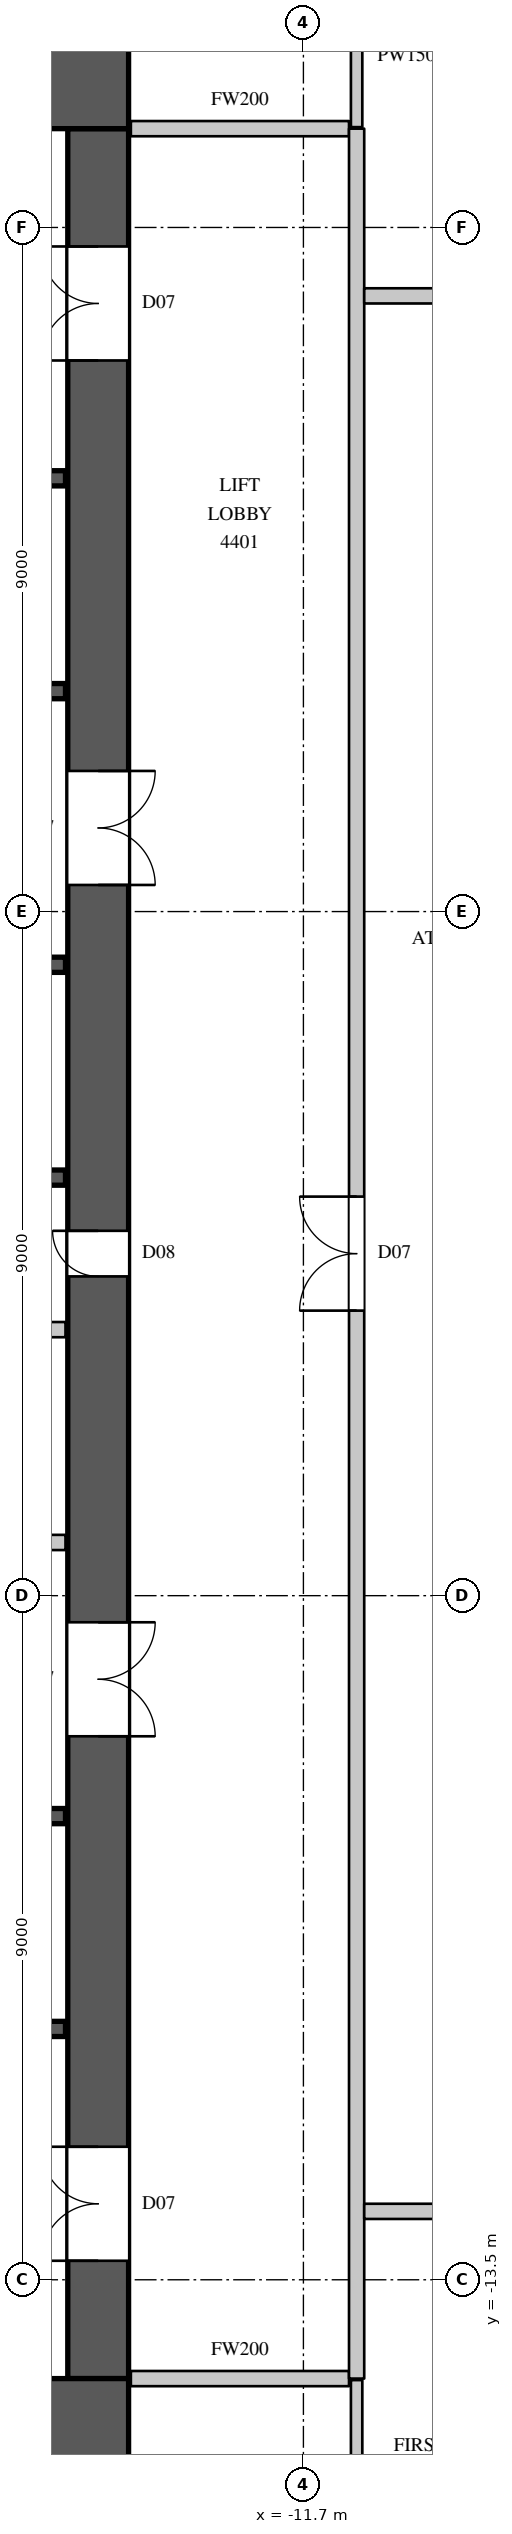
"""IFC4 building model, lengths in metres.
Left out: names, types, materials, properties, quantities, classifications, styles, units other than length and angle.
Written with IfcOpenShell. Run it as: python <this file> out.ifc"""

import sys

from ifc_helpers import new_model, si_unit, direction, frame, frame_2d, origin, place, context, subcontext, project, spatial, rectangle, extrude, element, fill, save


model = new_model("IFC4")
c1 = context("Model", 3, precision=1e-05, world=origin(), true_north=direction((0.0, 1.0)))
c2 = subcontext(c1, "Body", "Model", "MODEL_VIEW")
j1 = project(units=[si_unit("LENGTHUNIT", "METRE"), si_unit("PLANEANGLEUNIT", "RADIAN")], contexts=[c1])
p1 = place(None, origin())
s1 = spatial("IfcSite", under=j1, at=p1, CompositionType="ELEMENT")
p2 = place(p1, origin())
s2 = spatial("IfcBuilding", under=s1, at=p2, CompositionType="ELEMENT")
p3 = place(p2, frame((0.0, 0.0, 201.5)))
s3 = spatial("IfcBuildingStorey", under=s2, at=p3, CompositionType="ELEMENT", Elevation=201.5)
for number, where, z_axis, x_axis in (
    (1, (-30.0, 15.4, 0.0), (0.0, 0.0, 1.0), (1.0, 0.0, 0.0)),
    (2, (-30.0, -15.4, 0.0), (0.0, 0.0, 1.0), (1.0, 0.0, 0.0)),
):
    element("IfcWall", number, at=place(p3, frame(where, z_axis=z_axis, x_axis=x_axis)), inside=s3, PredefinedType="SHEAR", context=c2, shape_type="SweptSolid", body=[
        extrude(rectangle(XDim=16.0, YDim=1.2, at=frame_2d((8.0, 0.0))), origin(), (0.0, 0.0, 1.0), 4.1),
    ])
p4 = place(p3, frame((-14.4, -14.8, 0.0), z_axis=(0.0, 0.0, 1.0), x_axis=(0.0, 1.0, 0.0)))
e3 = element("IfcWall", 3, at=p4, inside=s3, PredefinedType="SHEAR", context=c2, shape_type="SweptSolid", body=[
    extrude(rectangle(XDim=29.6, YDim=0.8, at=frame_2d((14.8, 0.0))), origin(), (0.0, 0.0, 1.0), 4.1),
])
p5 = place(p4, frame((1.55, 0.0, 0.0)))
e4 = element("IfcOpeningElement", 4, at=p5, cuts=e3, PredefinedType="OPENING", context=c2, shape_type="SweptSolid", body=[
    extrude(rectangle(XDim=1.5, YDim=2.4, at=frame_2d((0.75, 1.2))), frame((0.0, 0.41, 0.0), z_axis=(0.0, -1.0, 0.0), x_axis=(1.0, 0.0, 0.0)), (0.0, 0.0, 1.0), 0.82),
])
p6 = place(p4, frame((26.55, 0.0, 0.0)))
e5 = element("IfcOpeningElement", 5, at=p6, cuts=e3, PredefinedType="OPENING", context=c2, shape_type="SweptSolid", body=[
    extrude(rectangle(XDim=1.5, YDim=2.4, at=frame_2d((0.75, 1.2))), frame((0.0, 0.41, 0.0), z_axis=(0.0, -1.0, 0.0), x_axis=(1.0, 0.0, 0.0)), (0.0, 0.0, 1.0), 0.82),
])
p7 = place(p4, frame((8.45, 0.0, 0.0)))
e6 = element("IfcOpeningElement", 6, at=p7, cuts=e3, PredefinedType="OPENING", context=c2, shape_type="SweptSolid", body=[
    extrude(rectangle(XDim=1.5, YDim=2.4, at=frame_2d((0.75, 1.2))), frame((0.0, 0.41, 0.0), z_axis=(0.0, -1.0, 0.0), x_axis=(1.0, 0.0, 0.0)), (0.0, 0.0, 1.0), 0.82),
])
p8 = place(p4, frame((19.65, 0.0, 0.0)))
e7 = element("IfcOpeningElement", 7, at=p8, cuts=e3, PredefinedType="OPENING", context=c2, shape_type="SweptSolid", body=[
    extrude(rectangle(XDim=1.5, YDim=2.4, at=frame_2d((0.75, 1.2))), frame((0.0, 0.41, 0.0), z_axis=(0.0, -1.0, 0.0), x_axis=(1.0, 0.0, 0.0)), (0.0, 0.0, 1.0), 0.82),
])
p9 = place(p4, frame((14.5, 0.0, 0.0)))
e8 = element("IfcOpeningElement", 8, at=p9, cuts=e3, PredefinedType="OPENING", context=c2, shape_type="SweptSolid", body=[
    extrude(rectangle(XDim=0.6, YDim=2.0, at=frame_2d((0.3, 1.0))), frame((0.0, 0.41, 0.0), z_axis=(0.0, -1.0, 0.0), x_axis=(1.0, 0.0, 0.0)), (0.0, 0.0, 1.0), 0.82),
])
p10 = place(p3, frame((-23.42, -3.8, 0.0), z_axis=(0.0, 0.0, 1.0), x_axis=(1.0, 0.0, 0.0)))
e9 = element("IfcWall", 9, at=p10, inside=s3, PredefinedType="PARTITIONING", context=c2, shape_type="SweptSolid", body=[
    extrude(rectangle(XDim=8.59, YDim=0.2, at=frame_2d((4.295, 0.0))), origin(), (0.0, 0.0, 1.0), 3.8),
])
p11 = place(p10, frame((2.0, 0.0, 0.0)))
e10 = element("IfcOpeningElement", 10, at=p11, cuts=e9, PredefinedType="OPENING", context=c2, shape_type="SweptSolid", body=[
    extrude(rectangle(XDim=0.9, YDim=2.2, at=frame_2d((0.45, 1.1))), frame((0.0, 0.11, 0.0), z_axis=(0.0, -1.0, 0.0), x_axis=(1.0, 0.0, 0.0)), (0.0, 0.0, 1.0), 0.22),
])
p12 = place(p10, frame((6.15, 0.0, 0.0)))
e11 = element("IfcOpeningElement", 11, at=p12, cuts=e9, PredefinedType="OPENING", context=c2, shape_type="SweptSolid", body=[
    extrude(rectangle(XDim=0.9, YDim=2.2, at=frame_2d((0.45, 1.1))), frame((0.0, 0.11, 0.0), z_axis=(0.0, -1.0, 0.0), x_axis=(1.0, 0.0, 0.0)), (0.0, 0.0, 1.0), 0.22),
])
for number, where, z_axis, x_axis in (
    (12, (-13.97, -14.8, 0.0), (0.0, 0.0, 1.0), (1.0, 0.0, 0.0)),
    (13, (-13.97, 14.8, 0.0), (0.0, 0.0, 1.0), (1.0, 0.0, 0.0)),
):
    element("IfcWall", number, at=place(p3, frame(where, z_axis=z_axis, x_axis=x_axis)), inside=s3, PredefinedType="PARTITIONING", context=c2, shape_type="SweptSolid", body=[
        extrude(rectangle(XDim=2.87, YDim=0.2, at=frame_2d((1.435, 0.0))), origin(), (0.0, 0.0, 1.0), 3.8),
    ])
p13 = place(p3, frame((-11.0, -14.8, 0.0), z_axis=(0.0, 0.0, 1.0), x_axis=(0.0, 1.0, 0.0)))
e14 = element("IfcWall", 14, at=p13, inside=s3, PredefinedType="PARTITIONING", context=c2, shape_type="SweptSolid", body=[
    extrude(rectangle(XDim=29.6, YDim=0.2, at=frame_2d((14.8, 0.0))), origin(), (0.0, 0.0, 1.0), 3.8),
])
p14 = place(p13, frame((14.05, 0.0, 0.0)))
e15 = element("IfcOpeningElement", 15, at=p14, cuts=e14, PredefinedType="OPENING", context=c2, shape_type="SweptSolid", body=[
    extrude(rectangle(XDim=1.5, YDim=2.4, at=frame_2d((0.75, 1.2))), frame((0.0, 0.11, 0.0), z_axis=(0.0, -1.0, 0.0), x_axis=(1.0, 0.0, 0.0)), (0.0, 0.0, 1.0), 0.22),
])
p15 = place(p3, frame((-10.9, -12.6, 0.0), z_axis=(0.0, 0.0, 1.0), x_axis=(1.0, 0.0, 0.0)))
e16 = element("IfcWall", 16, at=p15, inside=s3, PredefinedType="PARTITIONING", context=c2, shape_type="SweptSolid", body=[
    extrude(rectangle(XDim=15.521, YDim=0.2, at=frame_2d((7.76, 0.0))), origin(), (0.0, 0.0, 1.0), 3.8),
])
p16 = place(p15, frame((0.95, 0.0, 0.0)))
e17 = element("IfcOpeningElement", 17, at=p16, cuts=e16, PredefinedType="OPENING", context=c2, shape_type="SweptSolid", body=[
    extrude(rectangle(XDim=0.9, YDim=2.2, at=frame_2d((0.45, 1.1))), frame((0.0, 0.11, 0.0), z_axis=(0.0, -1.0, 0.0), x_axis=(1.0, 0.0, 0.0)), (0.0, 0.0, 1.0), 0.22),
])
p17 = place(p15, frame((3.95, 0.0, 0.0)))
e18 = element("IfcOpeningElement", 18, at=p17, cuts=e16, PredefinedType="OPENING", context=c2, shape_type="SweptSolid", body=[
    extrude(rectangle(XDim=0.9, YDim=2.2, at=frame_2d((0.45, 1.1))), frame((0.0, 0.11, 0.0), z_axis=(0.0, -1.0, 0.0), x_axis=(1.0, 0.0, 0.0)), (0.0, 0.0, 1.0), 0.22),
])
p18 = place(p15, frame((7.1, 0.0, 0.0)))
e19 = element("IfcOpeningElement", 19, at=p18, cuts=e16, PredefinedType="OPENING", context=c2, shape_type="SweptSolid", body=[
    extrude(rectangle(XDim=0.9, YDim=2.2, at=frame_2d((0.45, 1.1))), frame((0.0, 0.11, 0.0), z_axis=(0.0, -1.0, 0.0), x_axis=(1.0, 0.0, 0.0)), (0.0, 0.0, 1.0), 0.22),
])
p19 = place(p15, frame((10.0, 0.0, 0.0)))
e20 = element("IfcOpeningElement", 20, at=p19, cuts=e16, PredefinedType="OPENING", context=c2, shape_type="SweptSolid", body=[
    extrude(rectangle(XDim=0.9, YDim=2.2, at=frame_2d((0.45, 1.1))), frame((0.0, 0.11, 0.0), z_axis=(0.0, -1.0, 0.0), x_axis=(1.0, 0.0, 0.0)), (0.0, 0.0, 1.0), 0.22),
])
p20 = place(p15, frame((13.5, 0.0, 0.0)))
e21 = element("IfcOpeningElement", 21, at=p20, cuts=e16, PredefinedType="OPENING", context=c2, shape_type="SweptSolid", body=[
    extrude(rectangle(XDim=0.9, YDim=2.2, at=frame_2d((0.45, 1.1))), frame((0.0, 0.11, 0.0), z_axis=(0.0, -1.0, 0.0), x_axis=(1.0, 0.0, 0.0)), (0.0, 0.0, 1.0), 0.22),
])
p21 = place(p3, frame((-10.9, 12.6, 0.0), z_axis=(0.0, 0.0, 1.0), x_axis=(1.0, 0.0, 0.0)))
e22 = element("IfcWall", 22, at=p21, inside=s3, PredefinedType="PARTITIONING", context=c2, shape_type="SweptSolid", body=[
    extrude(rectangle(XDim=3.935, YDim=0.2, at=frame_2d((1.968, 0.0))), origin(), (0.0, 0.0, 1.0), 3.8),
])
p22 = place(p21, frame((1.7, 0.0, 0.0)))
e23 = element("IfcOpeningElement", 23, at=p22, cuts=e22, PredefinedType="OPENING", context=c2, shape_type="SweptSolid", body=[
    extrude(rectangle(XDim=1.1, YDim=2.4, at=frame_2d((0.55, 1.2))), frame((0.0, 0.11, 0.0), z_axis=(0.0, -1.0, 0.0), x_axis=(1.0, 0.0, 0.0)), (0.0, 0.0, 1.0), 0.22),
])
for number, where, z_axis, x_axis in (
    (24, (-11.0, -16.7, 0.0), (0.0, 0.0, 1.0), (0.0, 1.0, 0.0)),
    (25, (-11.0, 14.82, 0.0), (0.0, 0.0, 1.0), (0.0, 1.0, 0.0)),
):
    element("IfcWall", number, at=place(p3, frame(where, z_axis=z_axis, x_axis=x_axis)), inside=s3, PredefinedType="PARTITIONING", context=c2, shape_type="SweptSolid", body=[
        extrude(rectangle(XDim=1.88, YDim=0.15, at=frame_2d((0.94, 0.0))), origin(), (0.0, 0.0, 1.0), 3.8),
    ])
p23 = place(p3, frame((-29.17, -1.0, 0.0), z_axis=(0.0, 0.0, 1.0), x_axis=(1.0, 0.0, 0.0)))
e26 = element("IfcWall", 26, at=p23, inside=s3, PredefinedType="PARTITIONING", context=c2, shape_type="SweptSolid", body=[
    extrude(rectangle(XDim=14.34, YDim=0.2, at=frame_2d((7.17, 0.0))), origin(), (0.0, 0.0, 1.0), 3.8),
])
p24 = place(p3, frame((-26.08, 1.0, 0.0), z_axis=(0.0, 0.0, 1.0), x_axis=(1.0, 0.0, 0.0)))
e27 = element("IfcWall", 27, at=p24, inside=s3, PredefinedType="SHEAR", context=c2, shape_type="SweptSolid", body=[
    extrude(rectangle(XDim=11.25, YDim=0.2, at=frame_2d((5.625, 0.0))), origin(), (0.0, 0.0, 1.0), 3.8),
])
p25 = place(p3, frame((-26.08, 3.8, 0.0), z_axis=(0.0, 0.0, 1.0), x_axis=(1.0, 0.0, 0.0)))
e28 = element("IfcWall", 28, at=p25, inside=s3, PredefinedType="SHEAR", context=c2, shape_type="SweptSolid", body=[
    extrude(rectangle(XDim=11.25, YDim=0.2, at=frame_2d((5.625, 0.0))), origin(), (0.0, 0.0, 1.0), 3.8),
])
p26 = place(p25, frame((0.8, 0.0, 0.0)))
e29 = element("IfcOpeningElement", 29, at=p26, cuts=e28, PredefinedType="OPENING", context=c2, shape_type="SweptSolid", body=[
    extrude(rectangle(XDim=1.1, YDim=2.2, at=frame_2d((0.55, 1.1))), frame((0.0, 0.11, 0.0), z_axis=(0.0, -1.0, 0.0), x_axis=(1.0, 0.0, 0.0)), (0.0, 0.0, 1.0), 0.22),
])
p27 = place(p25, frame((3.55, 0.0, 0.0)))
e30 = element("IfcOpeningElement", 30, at=p27, cuts=e28, PredefinedType="OPENING", context=c2, shape_type="SweptSolid", body=[
    extrude(rectangle(XDim=1.1, YDim=2.2, at=frame_2d((0.55, 1.1))), frame((0.0, 0.11, 0.0), z_axis=(0.0, -1.0, 0.0), x_axis=(1.0, 0.0, 0.0)), (0.0, 0.0, 1.0), 0.22),
])
p28 = place(p25, frame((6.25, 0.0, 0.0)))
e31 = element("IfcOpeningElement", 31, at=p28, cuts=e28, PredefinedType="OPENING", context=c2, shape_type="SweptSolid", body=[
    extrude(rectangle(XDim=1.1, YDim=2.2, at=frame_2d((0.55, 1.1))), frame((0.0, 0.11, 0.0), z_axis=(0.0, -1.0, 0.0), x_axis=(1.0, 0.0, 0.0)), (0.0, 0.0, 1.0), 0.22),
])
p29 = place(p25, frame((9.15, 0.0, 0.0)))
e32 = element("IfcOpeningElement", 32, at=p29, cuts=e28, PredefinedType="OPENING", context=c2, shape_type="SweptSolid", body=[
    extrude(rectangle(XDim=1.1, YDim=2.2, at=frame_2d((0.55, 1.1))), frame((0.0, 0.11, 0.0), z_axis=(0.0, -1.0, 0.0), x_axis=(1.0, 0.0, 0.0)), (0.0, 0.0, 1.0), 0.22),
])
p30 = place(p3, frame((-17.92, -10.2, 0.0), z_axis=(0.0, 0.0, 1.0), x_axis=(1.0, 0.0, 0.0)))
e33 = element("IfcWall", 33, at=p30, inside=s3, PredefinedType="SHEAR", context=c2, shape_type="SweptSolid", body=[
    extrude(rectangle(XDim=3.09, YDim=0.2, at=frame_2d((1.545, 0.0))), origin(), (0.0, 0.0, 1.0), 3.8),
])
p31 = place(p30, frame((1.0, 0.0, 0.0)))
e34 = element("IfcOpeningElement", 34, at=p31, cuts=e33, PredefinedType="OPENING", context=c2, shape_type="SweptSolid", body=[
    extrude(rectangle(XDim=1.1, YDim=2.2, at=frame_2d((0.55, 1.1))), frame((0.0, 0.11, 0.0), z_axis=(0.0, -1.0, 0.0), x_axis=(1.0, 0.0, 0.0)), (0.0, 0.0, 1.0), 0.22),
])
p32 = place(p3, frame((-17.9, -7.4, 0.0), z_axis=(0.0, 0.0, 1.0), x_axis=(1.0, 0.0, 0.0)))
e35 = element("IfcWall", 35, at=p32, inside=s3, PredefinedType="SHEAR", context=c2, shape_type="SweptSolid", body=[
    extrude(rectangle(XDim=3.07, YDim=0.2, at=frame_2d((1.535, 0.0))), origin(), (0.0, 0.0, 1.0), 3.8),
])
p33 = place(p3, frame((-17.92, 7.4, 0.0), z_axis=(0.0, 0.0, 1.0), x_axis=(1.0, 0.0, 0.0)))
e36 = element("IfcWall", 36, at=p33, inside=s3, PredefinedType="SHEAR", context=c2, shape_type="SweptSolid", body=[
    extrude(rectangle(XDim=3.09, YDim=0.2, at=frame_2d((1.545, 0.0))), origin(), (0.0, 0.0, 1.0), 3.8),
])
p34 = place(p3, frame((-17.92, 10.2, 0.0), z_axis=(0.0, 0.0, 1.0), x_axis=(1.0, 0.0, 0.0)))
e37 = element("IfcWall", 37, at=p34, inside=s3, PredefinedType="SHEAR", context=c2, shape_type="SweptSolid", body=[
    extrude(rectangle(XDim=3.09, YDim=0.2, at=frame_2d((1.545, 0.0))), origin(), (0.0, 0.0, 1.0), 3.8),
])
p35 = place(p34, frame((1.0, 0.0, 0.0)))
e38 = element("IfcOpeningElement", 38, at=p35, cuts=e37, PredefinedType="OPENING", context=c2, shape_type="SweptSolid", body=[
    extrude(rectangle(XDim=1.1, YDim=2.2, at=frame_2d((0.55, 1.1))), frame((0.0, 0.11, 0.0), z_axis=(0.0, -1.0, 0.0), x_axis=(1.0, 0.0, 0.0)), (0.0, 0.0, 1.0), 0.22),
])
p36 = place(p14, origin())
e39 = element("IfcDoor", 39, at=p36, inside=s3, OperationType="DOUBLE_DOOR_SINGLE_SWING", PredefinedType="DOOR", context=c2, shape_type="SweptSolid", body=[
    extrude(rectangle(XDim=1.5, YDim=2.4, at=frame_2d((0.75, 1.2))), frame((0.0, 0.025, 0.0), z_axis=(0.0, -1.0, 0.0), x_axis=(1.0, 0.0, 0.0)), (0.0, 0.0, 1.0), 0.05),
])
fill(e15, e39)
p37 = place(p5, origin())
e40 = element("IfcDoor", 40, at=p37, inside=s3, OperationType="DOUBLE_DOOR_SINGLE_SWING", PredefinedType="DOOR", context=c2, shape_type="SweptSolid", body=[
    extrude(rectangle(XDim=1.5, YDim=2.4, at=frame_2d((0.75, 1.2))), frame((0.0, 0.395, 0.0), z_axis=(0.0, -1.0, 0.0), x_axis=(1.0, 0.0, 0.0)), (0.0, 0.0, 1.0), 0.05),
])
fill(e4, e40)
p38 = place(p6, origin())
e41 = element("IfcDoor", 41, at=p38, inside=s3, OperationType="DOUBLE_DOOR_SINGLE_SWING", PredefinedType="DOOR", context=c2, shape_type="SweptSolid", body=[
    extrude(rectangle(XDim=1.5, YDim=2.4, at=frame_2d((0.75, 1.2))), frame((0.0, 0.395, 0.0), z_axis=(0.0, -1.0, 0.0), x_axis=(1.0, 0.0, 0.0)), (0.0, 0.0, 1.0), 0.05),
])
fill(e5, e41)
p39 = place(p7, origin())
e42 = element("IfcDoor", 42, at=p39, inside=s3, OperationType="DOUBLE_DOOR_SINGLE_SWING", PredefinedType="DOOR", context=c2, shape_type="SweptSolid", body=[
    extrude(rectangle(XDim=1.5, YDim=2.4, at=frame_2d((0.75, 1.2))), frame((0.0, -0.345, 0.0), z_axis=(0.0, -1.0, 0.0), x_axis=(1.0, 0.0, 0.0)), (0.0, 0.0, 1.0), 0.05),
])
fill(e6, e42)
p40 = place(p8, origin())
e43 = element("IfcDoor", 43, at=p40, inside=s3, OperationType="DOUBLE_DOOR_SINGLE_SWING", PredefinedType="DOOR", context=c2, shape_type="SweptSolid", body=[
    extrude(rectangle(XDim=1.5, YDim=2.4, at=frame_2d((0.75, 1.2))), frame((0.0, -0.345, 0.0), z_axis=(0.0, -1.0, 0.0), x_axis=(1.0, 0.0, 0.0)), (0.0, 0.0, 1.0), 0.05),
])
fill(e7, e43)
p41 = place(p9, origin())
e44 = element("IfcDoor", 44, at=p41, inside=s3, OperationType="SINGLE_SWING_RIGHT", PredefinedType="DOOR", context=c2, shape_type="SweptSolid", body=[
    extrude(rectangle(XDim=0.6, YDim=2.0, at=frame_2d((0.3, 1.0))), frame((0.0, 0.395, 0.0), z_axis=(0.0, -1.0, 0.0), x_axis=(1.0, 0.0, 0.0)), (0.0, 0.0, 1.0), 0.05),
])
fill(e8, e44)
save(model, sys.argv[1])
